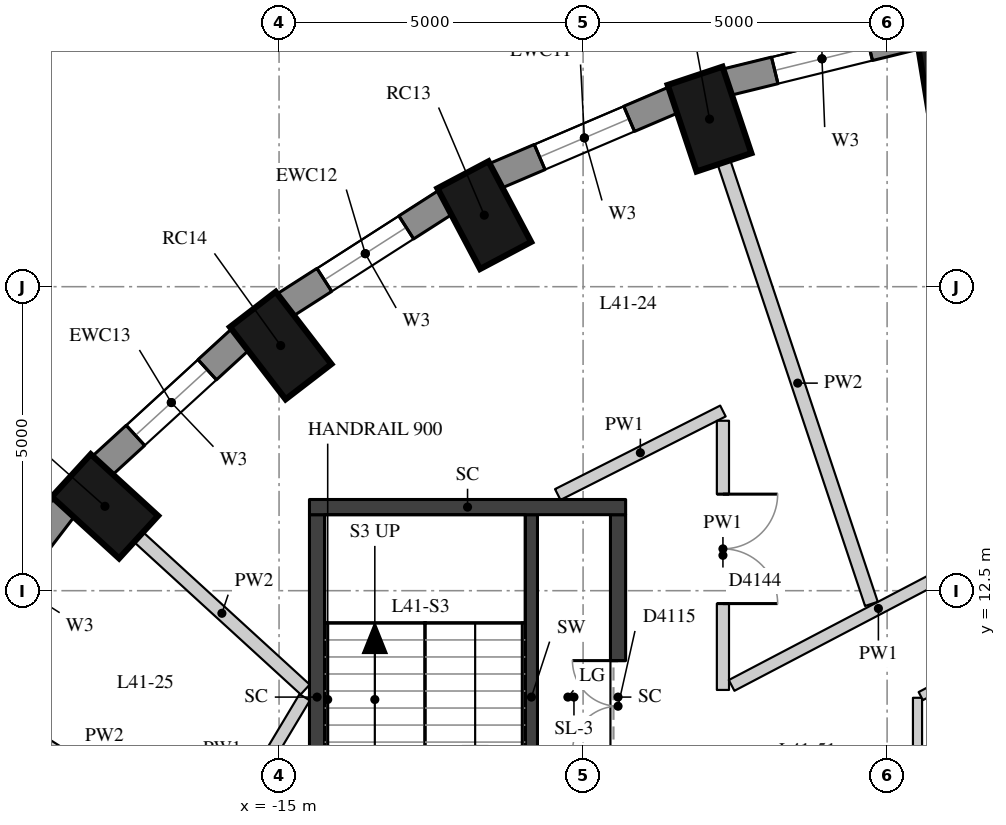
"""IFC4 building model, lengths in metres.
Left out: names, types, materials, properties, quantities, classifications, styles, units other than length and angle.
Written with IfcOpenShell. Run it as: python <this file> out.ifc"""

import sys

from ifc_helpers import new_model, si_unit, direction, frame, frame_2d, origin, origin_2d, place, context, subcontext, project, spatial, rectangle, extrude, element, fill, save


model = new_model("IFC4")
c1 = context("Model", 3, precision=1e-05, world=origin(), true_north=direction((0.0, 1.0)))
c2 = subcontext(c1, "Body", "Model", "MODEL_VIEW")
j1 = project(units=[si_unit("LENGTHUNIT", "METRE"), si_unit("PLANEANGLEUNIT", "RADIAN")], contexts=[c1])
p1 = place(None, origin())
s1 = spatial("IfcSite", under=j1, at=p1, CompositionType="ELEMENT")
p2 = place(p1, origin())
s2 = spatial("IfcBuilding", under=s1, at=p2, CompositionType="ELEMENT")
p3 = place(p2, frame((0.0, 0.0, 148.4)))
s3 = spatial("IfcBuildingStorey", under=s2, at=p3, CompositionType="ELEMENT", Elevation=148.4)
for number, where, z_axis, x_axis in (
    (1, (-3.972, 21.224, 0.0), (0.0, 0.0, 1.0), (-0.16, 0.987, 0.0)),
    (2, (-7.92, 20.256, 0.0), (0.0, 0.0, 1.0), (-0.317, 0.949, 0.0)),
    (3, (-11.625, 18.676, 0.0), (0.0, 0.0, 1.0), (-0.468, 0.884, 0.0)),
    (4, (-14.973, 16.532, 0.0), (0.0, 0.0, 1.0), (-0.61, 0.792, 0.0)),
    (5, (-17.864, 13.888, 0.0), (0.0, 0.0, 1.0), (-0.738, 0.675, 0.0)),
):
    element("IfcColumn", number, at=place(p3, frame(where, z_axis=z_axis, x_axis=x_axis)), inside=s3, PredefinedType="COLUMN", context=c2, shape_type="SweptSolid", body=[
        extrude(rectangle(XDim=1.5, YDim=0.95, at=origin_2d()), origin(), (0.0, 0.0, 1.0), 3.3),
    ])
p4 = place(p3, frame((-4.499, 21.633, 0.0), z_axis=(0.0, 0.0, 1.0), x_axis=(-0.971232901476, -0.238131583563, 0.0)))
e6 = element("IfcWall", 6, at=p4, inside=s3, PredefinedType="SOLIDWALL", context=c2, shape_type="SweptSolid", body=[
    extrude(rectangle(XDim=3.237, YDim=0.45, at=frame_2d((1.618, 0.0))), origin(), (0.0, 0.0, 1.0), 3.02),
])
p5 = place(p4, frame((0.818, 0.0, 0.4)))
e7 = element("IfcOpeningElement", 7, at=p5, cuts=e6, PredefinedType="OPENING", context=c2, shape_type="SweptSolid", body=[
    extrude(rectangle(XDim=1.6, YDim=1.75, at=frame_2d((0.8, 0.875))), frame((0.0, 0.235, 0.0), z_axis=(0.0, -1.0, 0.0), x_axis=(1.0, 0.0, 0.0)), (0.0, 0.0, 1.0), 0.47),
])
p6 = place(p3, frame((-8.506, 20.574, 0.0), z_axis=(0.0, 0.0, 1.0), x_axis=(-0.919798725687, -0.392390499663, 0.0)))
e8 = element("IfcWall", 8, at=p6, inside=s3, PredefinedType="SOLIDWALL", context=c2, shape_type="SweptSolid", body=[
    extrude(rectangle(XDim=3.2, YDim=0.45, at=frame_2d((1.6, 0.0))), origin(), (0.0, 0.0, 1.0), 3.02),
])
p7 = place(p6, frame((0.8, 0.0, 0.4)))
e9 = element("IfcOpeningElement", 9, at=p7, cuts=e8, PredefinedType="OPENING", context=c2, shape_type="SweptSolid", body=[
    extrude(rectangle(XDim=1.6, YDim=1.75, at=frame_2d((0.8, 0.875))), frame((0.0, 0.235, 0.0), z_axis=(0.0, -1.0, 0.0), x_axis=(1.0, 0.0, 0.0)), (0.0, 0.0, 1.0), 0.47),
])
p8 = place(p3, frame((-12.255, 18.893, 0.0), z_axis=(0.0, 0.0, 1.0), x_axis=(-0.842030726237, -0.539429565442, 0.0)))
e10 = element("IfcWall", 10, at=p8, inside=s3, PredefinedType="SOLIDWALL", context=c2, shape_type="SweptSolid", body=[
    extrude(rectangle(XDim=3.151, YDim=0.45, at=frame_2d((1.576, 0.0))), origin(), (0.0, 0.0, 1.0), 3.02),
])
p9 = place(p8, frame((0.776, 0.0, 0.4)))
e11 = element("IfcOpeningElement", 11, at=p9, cuts=e10, PredefinedType="OPENING", context=c2, shape_type="SweptSolid", body=[
    extrude(rectangle(XDim=1.6, YDim=1.75, at=frame_2d((0.8, 0.875))), frame((0.0, 0.235, 0.0), z_axis=(0.0, -1.0, 0.0), x_axis=(1.0, 0.0, 0.0)), (0.0, 0.0, 1.0), 0.47),
])
p10 = place(p3, frame((-15.63, 16.639, 0.0), z_axis=(0.0, 0.0, 1.0), x_axis=(-0.737808755941, -0.675009807082, 0.0)))
e12 = element("IfcWall", 12, at=p10, inside=s3, PredefinedType="SOLIDWALL", context=c2, shape_type="SweptSolid", body=[
    extrude(rectangle(XDim=3.094, YDim=0.45, at=frame_2d((1.547, 0.0))), origin(), (0.0, 0.0, 1.0), 3.02),
])
p11 = place(p10, frame((0.747, 0.0, 0.4)))
e13 = element("IfcOpeningElement", 13, at=p11, cuts=e12, PredefinedType="OPENING", context=c2, shape_type="SweptSolid", body=[
    extrude(rectangle(XDim=1.6, YDim=1.75, at=frame_2d((0.8, 0.875))), frame((0.0, 0.235, 0.0), z_axis=(0.0, -1.0, 0.0), x_axis=(1.0, 0.0, 0.0)), (0.0, 0.0, 1.0), 0.47),
])
p12 = place(p3, frame((-18.528, 13.879, 0.0), z_axis=(0.0, 0.0, 1.0), x_axis=(-0.607817056371, -0.794077090706, 0.0)))
e14 = element("IfcWall", 14, at=p12, inside=s3, PredefinedType="SOLIDWALL", context=c2, shape_type="SweptSolid", body=[
    extrude(rectangle(XDim=3.037, YDim=0.45, at=frame_2d((1.519, 0.0))), origin(), (0.0, 0.0, 1.0), 3.02),
])
p13 = place(p12, frame((0.719, 0.0, 0.4)))
e15 = element("IfcOpeningElement", 15, at=p13, cuts=e14, PredefinedType="OPENING", context=c2, shape_type="SweptSolid", body=[
    extrude(rectangle(XDim=1.6, YDim=1.75, at=frame_2d((0.8, 0.875))), frame((0.0, 0.235, 0.0), z_axis=(0.0, -1.0, 0.0), x_axis=(1.0, 0.0, 0.0)), (0.0, 0.0, 1.0), 0.47),
])
p14 = place(p3, frame((-10.85, 7.75, 0.0), z_axis=(0.0, 0.0, 1.0), x_axis=(0.0, 1.0, 0.0)))
e16 = element("IfcWall", 16, at=p14, inside=s3, PredefinedType="SHEAR", context=c2, shape_type="SweptSolid", body=[
    extrude(rectangle(XDim=6.0, YDim=0.2, at=frame_2d((3.0, 0.0))), origin(), (0.0, 0.0, 1.0), 3.02),
])
p15 = place(p14, frame((0.1, 0.0, 0.0)))
e17 = element("IfcOpeningElement", 17, at=p15, cuts=e16, PredefinedType="OPENING", context=c2, shape_type="SweptSolid", body=[
    extrude(rectangle(XDim=1.5, YDim=2.1, at=frame_2d((0.75, 1.05))), frame((0.0, 0.11, 0.0), z_axis=(0.0, -1.0, 0.0), x_axis=(1.0, 0.0, 0.0)), (0.0, 0.0, 1.0), 0.22),
])
p16 = place(p3, frame((-14.375, 7.75, -0.28), z_axis=(0.0, 0.0, 1.0), x_axis=(0.0, 1.0, 0.0)))
e18 = element("IfcWall", 18, at=p16, inside=s3, PredefinedType="SHEAR", context=c2, shape_type="SweptSolid", body=[
    extrude(rectangle(XDim=6.0, YDim=0.25, at=frame_2d((3.0, 0.0))), origin(), (0.0, 0.0, 1.0), 3.3),
])
p17 = place(p3, frame((-9.425, 7.75, -0.28), z_axis=(0.0, 0.0, 1.0), x_axis=(0.0, 1.0, 0.0)))
e19 = element("IfcWall", 19, at=p17, inside=s3, PredefinedType="SHEAR", context=c2, shape_type="SweptSolid", body=[
    extrude(rectangle(XDim=6.0, YDim=0.25, at=frame_2d((3.0, 0.0))), origin(), (0.0, 0.0, 1.0), 3.3),
])
p18 = place(p17, frame((2.1, 0.0, 0.28)))
e20 = element("IfcOpeningElement", 20, at=p18, cuts=e19, PredefinedType="OPENING", context=c2, shape_type="SweptSolid", body=[
    extrude(rectangle(XDim=1.5, YDim=2.1, at=frame_2d((0.75, 1.05))), frame((0.0, 0.135, 0.0), z_axis=(0.0, -1.0, 0.0), x_axis=(1.0, 0.0, 0.0)), (0.0, 0.0, 1.0), 0.27),
])
p19 = place(p3, frame((-14.5, 13.875, -0.28), z_axis=(0.0, 0.0, 1.0), x_axis=(1.0, 0.0, 0.0)))
e21 = element("IfcWall", 21, at=p19, inside=s3, PredefinedType="SHEAR", context=c2, shape_type="SweptSolid", body=[
    extrude(rectangle(XDim=5.2, YDim=0.25, at=frame_2d((2.6, 0.0))), origin(), (0.0, 0.0, 1.0), 3.3),
])
p20 = place(p3, frame((-16.228, 7.992, 0.0), z_axis=(0.0, 0.0, 1.0), x_axis=(0.513936465122, 0.857828251935, 0.0)))
e22 = element("IfcWall", 22, at=p20, inside=s3, PredefinedType="PARTITIONING", context=c2, shape_type="SweptSolid", body=[
    extrude(rectangle(XDim=3.21, YDim=0.2, at=frame_2d((1.605, 0.0))), origin(), (0.0, 0.0, 1.0), 3.02),
])
p21 = place(p20, frame((0.848, 0.0, 0.0)))
e23 = element("IfcOpeningElement", 23, at=p21, cuts=e22, PredefinedType="OPENING", context=c2, shape_type="SweptSolid", body=[
    extrude(rectangle(XDim=0.9, YDim=2.1, at=frame_2d((0.45, 1.05))), frame((0.0, 0.11, 0.0), z_axis=(0.0, -1.0, 0.0), x_axis=(1.0, 0.0, 0.0)), (0.0, 0.0, 1.0), 0.22),
])
p22 = place(p3, frame((-10.416, 14.082, 0.0), z_axis=(0.0, 0.0, 1.0), x_axis=(0.892396808139, 0.451251522793, 0.0)))
e24 = element("IfcWall", 24, at=p22, inside=s3, PredefinedType="PARTITIONING", context=c2, shape_type="SweptSolid", body=[
    extrude(rectangle(XDim=3.044, YDim=0.2, at=frame_2d((1.522, 0.0))), origin(), (0.0, 0.0, 1.0), 3.02),
])
p23 = place(p3, frame((-7.7, 15.295, 0.0), z_axis=(0.0, 0.0, 1.0), x_axis=(0.0, -1.0, 0.0)))
e25 = element("IfcWall", 25, at=p23, inside=s3, PredefinedType="PARTITIONING", context=c2, shape_type="SweptSolid", body=[
    extrude(rectangle(XDim=4.427, YDim=0.2, at=frame_2d((2.214, 0.0))), origin(), (0.0, 0.0, 1.0), 3.02),
])
p24 = place(p23, frame((1.207, 0.0, 0.0)))
e26 = element("IfcOpeningElement", 26, at=p24, cuts=e25, PredefinedType="OPENING", context=c2, shape_type="SweptSolid", body=[
    extrude(rectangle(XDim=1.8, YDim=2.1, at=frame_2d((0.9, 1.05))), frame((0.0, 0.11, 0.0), z_axis=(0.0, -1.0, 0.0), x_axis=(1.0, 0.0, 0.0)), (0.0, 0.0, 1.0), 0.22),
])
p25 = place(p3, frame((-7.557, 10.942, 0.0), z_axis=(0.0, 0.0, 1.0), x_axis=(0.885672830659, 0.464309850244, 0.0)))
e27 = element("IfcWall", 27, at=p25, inside=s3, PredefinedType="PARTITIONING", context=c2, shape_type="SweptSolid", body=[
    extrude(rectangle(XDim=5.452, YDim=0.2, at=frame_2d((2.726, 0.0))), origin(), (0.0, 0.0, 1.0), 3.02),
])
p26 = place(p3, frame((-4.5, 7.942, 0.0), z_axis=(0.0, 0.0, 1.0), x_axis=(0.0, 1.0, 0.0)))
e28 = element("IfcWall", 28, at=p26, inside=s3, PredefinedType="PARTITIONING", context=c2, shape_type="SweptSolid", body=[
    extrude(rectangle(XDim=2.796, YDim=0.15, at=frame_2d((1.398, 0.0))), origin(), (0.0, 0.0, 1.0), 3.02),
])
p27 = place(p3, frame((-4.447, 10.766, 0.0), z_axis=(0.0, 0.0, 1.0), x_axis=(0.885701482048, 0.464255193507, 0.0)))
e29 = element("IfcWall", 29, at=p27, inside=s3, PredefinedType="PARTITIONING", context=c2, shape_type="SweptSolid", body=[
    extrude(rectangle(XDim=2.315, YDim=0.15, at=frame_2d((1.158, 0.0))), origin(), (0.0, 0.0, 1.0), 3.02),
])
p28 = place(p3, frame((-7.683, 19.545, 0.0), z_axis=(0.0, 0.0, 1.0), x_axis=(0.316706037399, -0.94852374028, 0.0)))
e30 = element("IfcWall", 30, at=p28, inside=s3, PredefinedType="PARTITIONING", context=c2, shape_type="SweptSolid", body=[
    extrude(rectangle(XDim=7.656, YDim=0.22, at=frame_2d((3.828, 0.0))), origin(), (0.0, 0.0, 1.0), 3.02),
])
p29 = place(p3, frame((-17.31, 13.382, 0.0), z_axis=(0.0, 0.0, 1.0), x_axis=(0.737860436015, -0.674953314655, 0.0)))
e31 = element("IfcWall", 31, at=p29, inside=s3, PredefinedType="PARTITIONING", context=c2, shape_type="SweptSolid", body=[
    extrude(rectangle(XDim=3.714, YDim=0.22, at=frame_2d((1.857, 0.0))), origin(), (0.0, 0.0, 1.0), 3.02),
])
p30 = place(p3, frame((-19.573, 10.426, 0.0), z_axis=(0.0, 0.0, 1.0), x_axis=(0.846298736827, -0.532708595805, 0.0)))
e32 = element("IfcWall", 32, at=p30, inside=s3, PredefinedType="PARTITIONING", context=c2, shape_type="SweptSolid", body=[
    extrude(rectangle(XDim=4.021, YDim=0.22, at=frame_2d((2.011, 0.0))), origin(), (0.0, 0.0, 1.0), 3.02),
])
p31 = place(p5, origin())
e33 = element("IfcWindow", 33, at=p31, inside=s3, PartitioningType="SINGLE_PANEL", PredefinedType="WINDOW", context=c2, shape_type="SweptSolid", body=[
    extrude(rectangle(XDim=1.6, YDim=1.75, at=frame_2d((0.8, 0.875))), frame((0.0, 0.035, 0.0), z_axis=(0.0, -1.0, 0.0), x_axis=(1.0, 0.0, 0.0)), (0.0, 0.0, 1.0), 0.06),
])
fill(e7, e33)
p32 = place(p7, origin())
e34 = element("IfcWindow", 34, at=p32, inside=s3, PartitioningType="SINGLE_PANEL", PredefinedType="WINDOW", context=c2, shape_type="SweptSolid", body=[
    extrude(rectangle(XDim=1.6, YDim=1.75, at=frame_2d((0.8, 0.875))), frame((0.0, 0.035, 0.0), z_axis=(0.0, -1.0, 0.0), x_axis=(1.0, 0.0, 0.0)), (0.0, 0.0, 1.0), 0.06),
])
fill(e9, e34)
p33 = place(p9, origin())
e35 = element("IfcWindow", 35, at=p33, inside=s3, PartitioningType="SINGLE_PANEL", PredefinedType="WINDOW", context=c2, shape_type="SweptSolid", body=[
    extrude(rectangle(XDim=1.6, YDim=1.75, at=frame_2d((0.8, 0.875))), frame((0.0, 0.035, 0.0), z_axis=(0.0, -1.0, 0.0), x_axis=(1.0, 0.0, 0.0)), (0.0, 0.0, 1.0), 0.06),
])
fill(e11, e35)
p34 = place(p11, origin())
e36 = element("IfcWindow", 36, at=p34, inside=s3, PartitioningType="SINGLE_PANEL", PredefinedType="WINDOW", context=c2, shape_type="SweptSolid", body=[
    extrude(rectangle(XDim=1.6, YDim=1.75, at=frame_2d((0.8, 0.875))), frame((0.0, 0.035, 0.0), z_axis=(0.0, -1.0, 0.0), x_axis=(1.0, 0.0, 0.0)), (0.0, 0.0, 1.0), 0.06),
])
fill(e13, e36)
p35 = place(p18, origin())
e37 = element("IfcDoor", 37, at=p35, inside=s3, OperationType="DOUBLE_DOOR_SINGLE_SWING", PredefinedType="DOOR", context=c2, shape_type="SweptSolid", body=[
    extrude(rectangle(XDim=1.5, YDim=2.1, at=frame_2d((0.75, 1.05))), frame((0.0, 0.025, 0.0), z_axis=(0.0, -1.0, 0.0), x_axis=(1.0, 0.0, 0.0)), (0.0, 0.0, 1.0), 0.05),
])
fill(e20, e37)
p36 = place(p24, origin())
e38 = element("IfcDoor", 38, at=p36, inside=s3, OperationType="DOUBLE_DOOR_SINGLE_SWING", PredefinedType="DOOR", context=c2, shape_type="SweptSolid", body=[
    extrude(rectangle(XDim=1.8, YDim=2.1, at=frame_2d((0.9, 1.05))), frame((0.0, 0.025, 0.0), z_axis=(0.0, -1.0, 0.0), x_axis=(1.0, 0.0, 0.0)), (0.0, 0.0, 1.0), 0.05),
])
fill(e26, e38)
save(model, sys.argv[1])
